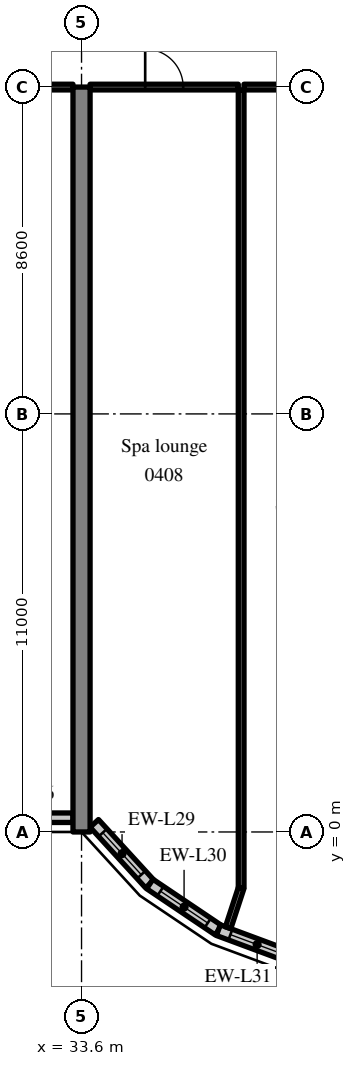
"""IFC4 building model, lengths in metres.
Left out: names, types, materials, properties, quantities, classifications, styles, units other than length and angle.
Written with IfcOpenShell. Run it as: python <this file> out.ifc"""

import sys

from ifc_helpers import new_model, si_unit, direction, frame, frame_2d, origin, place, context, subcontext, project, spatial, rectangle, extrude, source, transform, mapped, element, fill, save


model = new_model("IFC4")
c1 = context("Model", 3, precision=1e-05, world=origin(), true_north=direction((0.0, 1.0)))
c2 = subcontext(c1, "Body", "Model", "MODEL_VIEW")
j1 = project(units=[si_unit("LENGTHUNIT", "METRE"), si_unit("PLANEANGLEUNIT", "RADIAN")], contexts=[c1])
p1 = place(None, origin())
s1 = spatial("IfcSite", under=j1, at=p1, CompositionType="ELEMENT")
p2 = place(p1, origin())
s2 = spatial("IfcBuilding", under=s1, at=p2, CompositionType="ELEMENT")
p3 = place(p2, frame((0.0, 0.0, 23.0)))
s3 = spatial("IfcBuildingStorey", under=s2, at=p3, CompositionType="ELEMENT", Elevation=23.0)
m1 = source(origin(), c2, "Body", "SweptSolid", [
    extrude(rectangle(XDim=19.6, YDim=0.45, at=frame_2d((9.8, 0.0))), origin(), (0.0, 0.0, 1.0), 4.52),
])
p4 = place(p3, frame((33.6, 0.0, 0.0), z_axis=(0.0, 0.0, 1.0), x_axis=(0.0, 1.0, 0.0)))
e1 = element("IfcWall", 1, at=p4, inside=s3, PredefinedType="SHEAR", context=c2, shape_type="MappedRepresentation", body=[
    mapped(m1, transform((0.0, 0.0, 0.0), scale=1.0)),
])
m2 = source(origin(), c2, "Body", "SweptSolid", [
    extrude(rectangle(XDim=3.525, YDim=0.25, at=frame_2d((1.762, 0.0))), origin(), (0.0, 0.0, 1.0), 3.77),
])
p5 = place(p3, frame((29.85, 0.375, 0.0), z_axis=(0.0, 0.0, 1.0), x_axis=(1.0, 0.0, 0.0)))
e2 = element("IfcWall", 2, at=p5, inside=s3, PredefinedType="SOLIDWALL", context=c2, shape_type="MappedRepresentation", body=[
    mapped(m2, transform((0.0, 0.0, 0.0), scale=1.0)),
])
m3 = source(origin(), c2, "Body", "SweptSolid", [
    extrude(rectangle(XDim=1.5, YDim=1.5, at=frame_2d((0.75, 0.75))), frame((0.0, 0.135, 0.0), z_axis=(0.0, -1.0, 0.0), x_axis=(1.0, 0.0, 0.0)), (0.0, 0.0, 1.0), 0.27),
])
p6 = place(p5, frame((1.012, 0.0, 0.9)))
e3 = element("IfcOpeningElement", 3, at=p6, cuts=e2, PredefinedType="OPENING", context=c2, shape_type="MappedRepresentation", body=[
    mapped(m3, transform((0.0, 0.0, 0.0), scale=1.0)),
])
m4 = source(origin(), c2, "Body", "SweptSolid", [
    extrude(rectangle(XDim=2.162, YDim=0.3, at=frame_2d((1.081, 0.0))), origin(), (0.0, 0.0, 1.0), 4.52),
])
p7 = place(p3, frame((33.936, 0.226, 0.0), z_axis=(0.0, 0.0, 1.0), x_axis=(0.67537173084, -0.737477474355, 0.0)))
e4 = element("IfcWall", 4, at=p7, inside=s3, PredefinedType="SOLIDWALL", context=c2, shape_type="MappedRepresentation", body=[
    mapped(m4, transform((0.0, 0.0, 0.0), scale=1.0)),
])
m5 = source(origin(), c2, "Body", "SweptSolid", [
    extrude(rectangle(XDim=1.5, YDim=2.0, at=frame_2d((0.75, 1.0))), frame((0.0, 0.16, 0.0), z_axis=(0.0, -1.0, 0.0), x_axis=(1.0, 0.0, 0.0)), (0.0, 0.0, 1.0), 0.32),
])
p8 = place(p7, frame((0.331, 0.0, 0.9)))
e5 = element("IfcOpeningElement", 5, at=p8, cuts=e4, PredefinedType="OPENING", context=c2, shape_type="MappedRepresentation", body=[
    mapped(m5, transform((0.0, 0.0, 0.0), scale=1.0)),
])
m6 = source(origin(), c2, "Body", "SweptSolid", [
    extrude(rectangle(XDim=2.176, YDim=0.3, at=frame_2d((1.088, 0.0))), origin(), (0.0, 0.0, 1.0), 4.52),
])
p9 = place(p3, frame((35.396, -1.369, 0.0), z_axis=(0.0, 0.0, 1.0), x_axis=(0.829590746428, -0.558371913192, 0.0)))
e6 = element("IfcWall", 6, at=p9, inside=s3, PredefinedType="SOLIDWALL", context=c2, shape_type="MappedRepresentation", body=[
    mapped(m6, transform((0.0, 0.0, 0.0), scale=1.0)),
])
p10 = place(p9, frame((0.338, 0.0, 0.9)))
e7 = element("IfcOpeningElement", 7, at=p10, cuts=e6, PredefinedType="OPENING", context=c2, shape_type="MappedRepresentation", body=[
    mapped(m5, transform((0.0, 0.0, 0.0), scale=1.0)),
])
p11 = place(p3, frame((37.201, -2.583, 0.0), z_axis=(0.0, 0.0, 1.0), x_axis=(0.93754555999, -0.347862505801, 0.0)))
e8 = element("IfcWall", 8, at=p11, inside=s3, PredefinedType="SOLIDWALL", context=c2, shape_type="MappedRepresentation", body=[
    mapped(m6, transform((0.0, 0.0, 0.0), scale=1.0)),
])
p12 = place(p11, frame((0.338, 0.0, 0.9)))
e9 = element("IfcOpeningElement", 9, at=p12, cuts=e8, PredefinedType="OPENING", context=c2, shape_type="MappedRepresentation", body=[
    mapped(m5, transform((0.0, 0.0, 0.0), scale=1.0)),
])
m7 = source(origin(), c2, "Body", "SweptSolid", [
    extrude(rectangle(XDim=3.9, YDim=0.15, at=frame_2d((1.95, 0.0))), origin(), (0.0, 0.0, 1.0), 3.82),
])
p13 = place(p3, frame((29.475, 19.6, 0.0), z_axis=(0.0, 0.0, 1.0), x_axis=(1.0, 0.0, 0.0)))
e10 = element("IfcWall", 10, at=p13, inside=s3, PredefinedType="PARTITIONING", context=c2, shape_type="MappedRepresentation", body=[
    mapped(m7, transform((0.0, 0.0, 0.0), scale=1.0)),
])
m8 = source(origin(), c2, "Body", "SweptSolid", [
    extrude(rectangle(XDim=1.0, YDim=2.1, at=frame_2d((0.5, 1.05))), frame((0.0, 0.085, 0.0), z_axis=(0.0, -1.0, 0.0), x_axis=(1.0, 0.0, 0.0)), (0.0, 0.0, 1.0), 0.17),
])
p14 = place(p13, frame((1.45, 0.0, 0.0)))
e11 = element("IfcOpeningElement", 11, at=p14, cuts=e10, PredefinedType="OPENING", context=c2, shape_type="MappedRepresentation", body=[
    mapped(m8, transform((0.0, 0.0, 0.0), scale=1.0)),
])
m9 = source(origin(), c2, "Body", "SweptSolid", [
    extrude(rectangle(XDim=3.9, YDim=0.15, at=frame_2d((1.95, 0.0))), origin(), (0.0, 0.0, 1.0), 3.82),
])
p15 = place(p3, frame((33.825, 19.6, 0.0), z_axis=(0.0, 0.0, 1.0), x_axis=(1.0, 0.0, 0.0)))
e12 = element("IfcWall", 12, at=p15, inside=s3, PredefinedType="PARTITIONING", context=c2, shape_type="MappedRepresentation", body=[
    mapped(m9, transform((0.0, 0.0, 0.0), scale=1.0)),
])
p16 = place(p15, frame((1.45, 0.0, 0.0)))
e13 = element("IfcOpeningElement", 13, at=p16, cuts=e12, PredefinedType="OPENING", context=c2, shape_type="MappedRepresentation", body=[
    mapped(m8, transform((0.0, 0.0, 0.0), scale=1.0)),
])
p17 = place(p3, frame((37.875, 19.6, 0.0), z_axis=(0.0, 0.0, 1.0), x_axis=(1.0, 0.0, 0.0)))
e14 = element("IfcWall", 14, at=p17, inside=s3, PredefinedType="PARTITIONING", context=c2, shape_type="MappedRepresentation", body=[
    mapped(m7, transform((0.0, 0.0, 0.0), scale=1.0)),
])
p18 = place(p17, frame((1.45, 0.0, 0.0)))
e15 = element("IfcOpeningElement", 15, at=p18, cuts=e14, PredefinedType="OPENING", context=c2, shape_type="MappedRepresentation", body=[
    mapped(m8, transform((0.0, 0.0, 0.0), scale=1.0)),
])
m10 = source(origin(), c2, "Body", "SweptSolid", [
    extrude(rectangle(XDim=20.998, YDim=0.15, at=frame_2d((10.499, 0.0))), origin(), (0.0, 0.0, 1.0), 4.52),
])
p19 = place(p3, frame((37.8, -1.473, 0.0), z_axis=(0.0, 0.0, 1.0), x_axis=(0.0, 1.0, 0.0)))
e16 = element("IfcWall", 16, at=p19, inside=s3, PredefinedType="PARTITIONING", context=c2, shape_type="MappedRepresentation", body=[
    mapped(m10, transform((0.0, 0.0, 0.0), scale=1.0)),
])
m11 = source(origin(), c2, "Body", "SweptSolid", [
    extrude(rectangle(XDim=1.101, YDim=0.15, at=frame_2d((0.55, 0.0))), origin(), (0.0, 0.0, 1.0), 4.52),
])
p20 = place(p3, frame((37.457, -2.519, 0.0), z_axis=(0.0, 0.0, 1.0), x_axis=(0.311567081539, 0.950224159712, 0.0)))
e17 = element("IfcWall", 17, at=p20, inside=s3, PredefinedType="PARTITIONING", context=c2, shape_type="MappedRepresentation", body=[
    mapped(m11, transform((0.0, 0.0, 0.0), scale=1.0)),
])
m12 = source(origin(), c2, "Body", "SweptSolid", [
    extrude(rectangle(XDim=1.5, YDim=2.0, at=frame_2d((0.75, 1.0))), frame((0.0, 0.03, 0.0), z_axis=(0.0, -1.0, 0.0), x_axis=(1.0, 0.0, 0.0)), (0.0, 0.0, 1.0), 0.06),
])
p21 = place(p8, origin())
e18 = element("IfcWindow", 18, at=p21, inside=s3, PartitioningType="SINGLE_PANEL", PredefinedType="WINDOW", context=c2, shape_type="MappedRepresentation", body=[
    mapped(m12, transform((0.0, 0.0, 0.0), scale=1.0)),
])
fill(e5, e18)
p22 = place(p10, origin())
e19 = element("IfcWindow", 19, at=p22, inside=s3, PartitioningType="SINGLE_PANEL", PredefinedType="WINDOW", context=c2, shape_type="MappedRepresentation", body=[
    mapped(m12, transform((0.0, 0.0, 0.0), scale=1.0)),
])
fill(e7, e19)
p23 = place(p12, origin())
e20 = element("IfcWindow", 20, at=p23, inside=s3, PartitioningType="SINGLE_PANEL", PredefinedType="WINDOW", context=c2, shape_type="MappedRepresentation", body=[
    mapped(m12, transform((0.0, 0.0, 0.0), scale=1.0)),
])
fill(e9, e20)
m13 = source(origin(), c2, "Body", "SweptSolid", [
    extrude(rectangle(XDim=1.0, YDim=2.1, at=frame_2d((0.5, 1.05))), frame((0.0, 0.025, 0.0), z_axis=(0.0, -1.0, 0.0), x_axis=(1.0, 0.0, 0.0)), (0.0, 0.0, 1.0), 0.05),
])
p24 = place(p16, origin())
e21 = element("IfcDoor", 21, at=p24, inside=s3, OperationType="SINGLE_SWING_LEFT", PredefinedType="DOOR", context=c2, shape_type="MappedRepresentation", body=[
    mapped(m13, transform((0.0, 0.0, 0.0), scale=1.0)),
])
fill(e13, e21)
save(model, sys.argv[1])
